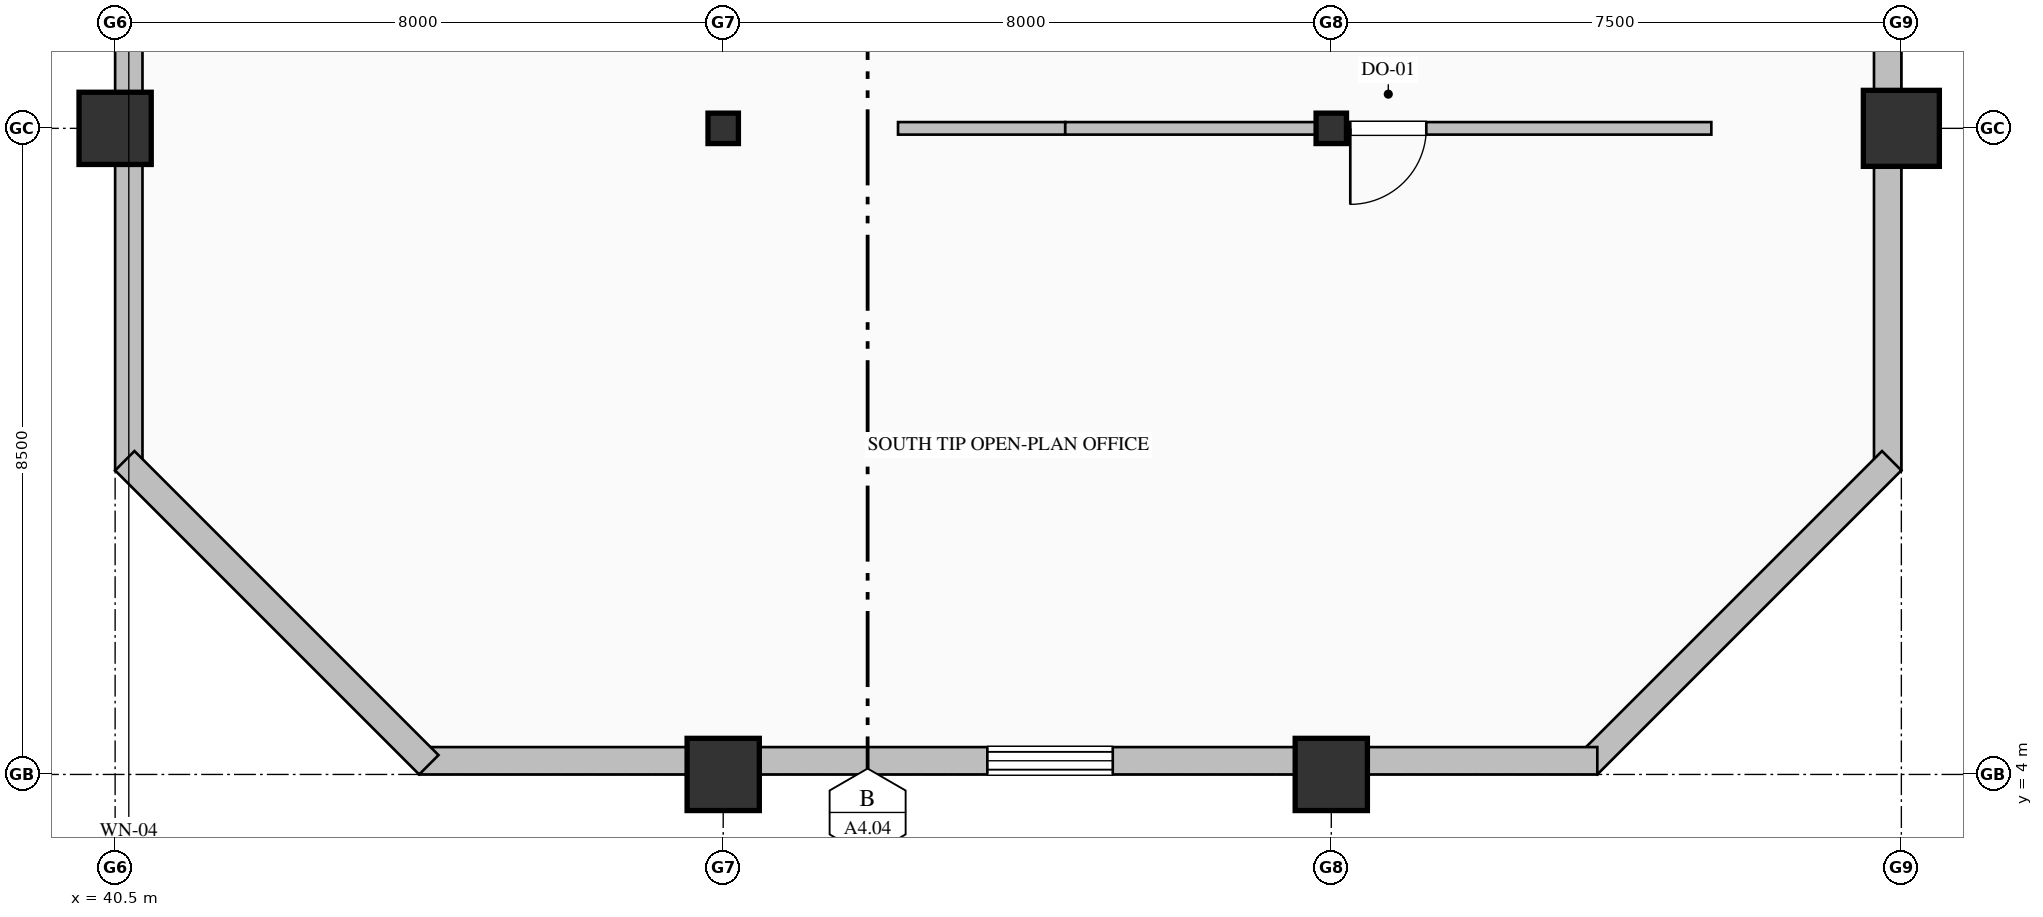
"""IFC4 building model, lengths in metres.
Left out: names, types, materials, properties, quantities, classifications, styles, units other than length and angle.
Written with IfcOpenShell. Run it as: python <this file> out.ifc"""

import sys

from ifc_helpers import new_model, si_unit, direction, frame, frame_2d, origin, origin_2d, place, context, subcontext, project, spatial, rectangle, hollow_rectangle, hollow_circle, i_section, extrude, element, fill, save


model = new_model("IFC4")
c1 = context("Model", 3, precision=1e-05, world=origin(), true_north=direction((0.0, 1.0)))
c2 = subcontext(c1, "Body", "Model", "MODEL_VIEW")
j1 = project(units=[si_unit("LENGTHUNIT", "METRE"), si_unit("PLANEANGLEUNIT", "RADIAN")], contexts=[c1])
p1 = place(None, origin())
s1 = spatial("IfcSite", under=j1, at=p1, CompositionType="ELEMENT")
p2 = place(p1, origin())
s2 = spatial("IfcBuilding", under=s1, at=p2, CompositionType="ELEMENT")
p3 = place(p2, frame((0.0, 0.0, 167.0)))
s3 = spatial("IfcBuildingStorey", under=s2, at=p3, CompositionType="ELEMENT", Elevation=167.0)
for number, where, z_axis, x_axis in (
    (1, (40.5, 12.5, 0.0), (0.0, 0.0, 1.0), (1.0, 0.0, 0.0)),
    (2, (48.5, 4.0, 0.0), (0.0, 0.0, 1.0), (1.0, 0.0, 0.0)),
):
    element("IfcColumn", number, at=place(p3, frame(where, z_axis=z_axis, x_axis=x_axis)), inside=s3, PredefinedType="COLUMN", context=c2, shape_type="SweptSolid", body=[
        extrude(hollow_rectangle(XDim=0.95, YDim=0.95, WallThickness=0.036, at=origin_2d()), origin(), (0.0, 0.0, 1.0), 4.0),
    ])
p4 = place(p3, frame((48.5, 12.5, 0.0), z_axis=(0.0, 0.0, 1.0), x_axis=(1.0, 0.0, 0.0)))
e3 = element("IfcColumn", 3, at=p4, inside=s3, PredefinedType="COLUMN", context=c2, shape_type="SweptSolid", body=[
    extrude(i_section(OverallWidth=0.4, OverallDepth=0.4, WebThickness=0.013, FlangeThickness=0.021, FilletRadius=0.022, at=origin_2d()), origin(), (0.0, 0.0, 1.0), 4.0),
])
p5 = place(p3, frame((56.5, 4.0, 0.0), z_axis=(0.0, 0.0, 1.0), x_axis=(1.0, 0.0, 0.0)))
e4 = element("IfcColumn", 4, at=p5, inside=s3, PredefinedType="COLUMN", context=c2, shape_type="SweptSolid", body=[
    extrude(hollow_rectangle(XDim=0.95, YDim=0.95, WallThickness=0.036, at=origin_2d()), origin(), (0.0, 0.0, 1.0), 4.0),
])
p6 = place(p3, frame((56.5, 12.5, 0.0), z_axis=(0.0, 0.0, 1.0), x_axis=(1.0, 0.0, 0.0)))
e5 = element("IfcColumn", 5, at=p6, inside=s3, PredefinedType="COLUMN", context=c2, shape_type="SweptSolid", body=[
    extrude(i_section(OverallWidth=0.4, OverallDepth=0.4, WebThickness=0.013, FlangeThickness=0.021, FilletRadius=0.022, at=origin_2d()), origin(), (0.0, 0.0, 1.0), 4.0),
])
p7 = place(p3, frame((64.0, 12.5, 0.0), z_axis=(0.0, 0.0, 1.0), x_axis=(1.0, 0.0, 0.0)))
e6 = element("IfcColumn", 6, at=p7, inside=s3, PredefinedType="COLUMN", context=c2, shape_type="SweptSolid", body=[
    extrude(hollow_circle(Radius=0.5, WallThickness=0.036, at=origin_2d()), origin(), (0.0, 0.0, 1.0), 4.0),
])
p8 = place(p3, frame((40.68, 8.0, 0.0), z_axis=(0.0, 0.0, 1.0), x_axis=(0.0, 1.0, 0.0)))
e7 = element("IfcWall", 7, at=p8, inside=s3, PredefinedType="SOLIDWALL", context=c2, shape_type="SweptSolid", body=[
    extrude(rectangle(XDim=20.36, YDim=0.36, at=frame_2d((10.18, 0.0))), origin(), (0.0, 0.0, 1.0), 3.165),
])
p9 = place(p8, frame((13.575, 0.0, 0.85)))
e8 = element("IfcOpeningElement", 8, at=p9, cuts=e7, PredefinedType="OPENING", context=c2, shape_type="SweptSolid", body=[
    extrude(rectangle(XDim=1.65, YDim=1.95, at=frame_2d((0.825, 0.975))), frame((0.0, 0.19, 0.0), z_axis=(0.0, -1.0, 0.0), x_axis=(1.0, 0.0, 0.0)), (0.0, 0.0, 1.0), 0.38),
])
p10 = place(p3, frame((63.82, 36.05, 0.0), z_axis=(0.0, 0.0, 1.0), x_axis=(0.0, -1.0, 0.0)))
e9 = element("IfcWall", 9, at=p10, inside=s3, PredefinedType="SOLIDWALL", context=c2, shape_type="SweptSolid", body=[
    extrude(rectangle(XDim=28.05, YDim=0.36, at=frame_2d((14.025, 0.0))), origin(), (0.0, 0.0, 1.0), 3.265),
])
p11 = place(p10, frame((2.775, 0.0, 0.85)))
e10 = element("IfcOpeningElement", 10, at=p11, cuts=e9, PredefinedType="OPENING", context=c2, shape_type="SweptSolid", body=[
    extrude(rectangle(XDim=1.65, YDim=1.95, at=frame_2d((0.825, 0.975))), frame((0.0, 0.19, 0.0), z_axis=(0.0, -1.0, 0.0), x_axis=(1.0, 0.0, 0.0)), (0.0, 0.0, 1.0), 0.38),
])
p12 = place(p10, frame((13.575, 0.0, 0.85)))
e11 = element("IfcOpeningElement", 11, at=p12, cuts=e9, PredefinedType="OPENING", context=c2, shape_type="SweptSolid", body=[
    extrude(rectangle(XDim=1.65, YDim=1.95, at=frame_2d((0.825, 0.975))), frame((0.0, 0.19, 0.0), z_axis=(0.0, -1.0, 0.0), x_axis=(1.0, 0.0, 0.0)), (0.0, 0.0, 1.0), 0.38),
])
p13 = place(p3, frame((63.873, 8.127, 0.0), z_axis=(0.0, 0.0, 1.0), x_axis=(-0.707106781187, -0.707106781187, 0.0)))
e12 = element("IfcWall", 12, at=p13, inside=s3, PredefinedType="SOLIDWALL", context=c2, shape_type="SweptSolid", body=[
    extrude(rectangle(XDim=5.657, YDim=0.36, at=frame_2d((2.828, 0.0))), origin(), (0.0, 0.0, 1.0), 3.765),
])
p14 = place(p3, frame((60.0, 4.18, 0.0), z_axis=(0.0, 0.0, 1.0), x_axis=(-1.0, 0.0, 0.0)))
e13 = element("IfcWall", 13, at=p14, inside=s3, PredefinedType="SOLIDWALL", context=c2, shape_type="SweptSolid", body=[
    extrude(rectangle(XDim=15.5, YDim=0.36, at=frame_2d((7.75, 0.0))), origin(), (0.0, 0.0, 1.0), 3.265),
])
p15 = place(p14, frame((6.375, 0.0, 0.85)))
e14 = element("IfcOpeningElement", 14, at=p15, cuts=e13, PredefinedType="OPENING", context=c2, shape_type="SweptSolid", body=[
    extrude(rectangle(XDim=1.65, YDim=1.95, at=frame_2d((0.825, 0.975))), frame((0.0, 0.19, 0.0), z_axis=(0.0, -1.0, 0.0), x_axis=(1.0, 0.0, 0.0)), (0.0, 0.0, 1.0), 0.38),
])
p16 = place(p3, frame((44.627, 4.127, 0.0), z_axis=(0.0, 0.0, 1.0), x_axis=(-0.707106781187, 0.707106781187, 0.0)))
e15 = element("IfcWall", 15, at=p16, inside=s3, PredefinedType="SOLIDWALL", context=c2, shape_type="SweptSolid", body=[
    extrude(rectangle(XDim=5.657, YDim=0.36, at=frame_2d((2.828, 0.0))), origin(), (0.0, 0.0, 1.0), 3.765),
])
p17 = place(p3, frame((53.0, 12.5, 0.0), z_axis=(0.0, 0.0, 1.0), x_axis=(-1.0, 0.0, 0.0)))
e16 = element("IfcWall", 16, at=p17, inside=s3, PredefinedType="PARTITIONING", context=c2, shape_type="SweptSolid", body=[
    extrude(rectangle(XDim=2.2, YDim=0.165, at=frame_2d((1.1, 0.0))), origin(), (0.0, 0.0, 1.0), 3.157),
])
p18 = place(p3, frame((61.5, 12.5, 0.0), z_axis=(0.0, 0.0, 1.0), x_axis=(-1.0, 0.0, 0.0)))
e17 = element("IfcWall", 17, at=p18, inside=s3, PredefinedType="PARTITIONING", context=c2, shape_type="SweptSolid", body=[
    extrude(rectangle(XDim=8.5, YDim=0.165, at=frame_2d((4.25, 0.0))), origin(), (0.0, 0.0, 1.0), 3.157),
])
p19 = place(p18, frame((3.75, 0.0, 0.0)))
e18 = element("IfcOpeningElement", 18, at=p19, cuts=e17, PredefinedType="OPENING", context=c2, shape_type="SweptSolid", body=[
    extrude(rectangle(XDim=1.0, YDim=2.15, at=frame_2d((0.5, 1.075))), frame((0.0, 0.093, 0.0), z_axis=(0.0, -1.0, 0.0), x_axis=(1.0, 0.0, 0.0)), (0.0, 0.0, 1.0), 0.185),
])
p20 = place(p15, origin())
e19 = element("IfcWindow", 19, at=p20, inside=s3, PartitioningType="DOUBLE_PANEL_VERTICAL", PredefinedType="WINDOW", context=c2, shape_type="SweptSolid", body=[
    extrude(rectangle(XDim=1.65, YDim=1.95, at=frame_2d((0.825, 0.975))), frame((0.0, 0.15, 0.0), z_axis=(0.0, -1.0, 0.0), x_axis=(1.0, 0.0, 0.0)), (0.0, 0.0, 1.0), 0.06),
])
fill(e14, e19)
p21 = place(p19, origin())
e20 = element("IfcDoor", 20, at=p21, inside=s3, OperationType="SINGLE_SWING_RIGHT", PredefinedType="DOOR", context=c2, shape_type="SweptSolid", body=[
    extrude(rectangle(XDim=1.0, YDim=2.15, at=frame_2d((0.5, 1.075))), frame((0.0, 0.025, 0.0), z_axis=(0.0, -1.0, 0.0), x_axis=(1.0, 0.0, 0.0)), (0.0, 0.0, 1.0), 0.05),
])
fill(e18, e20)
save(model, sys.argv[1])
